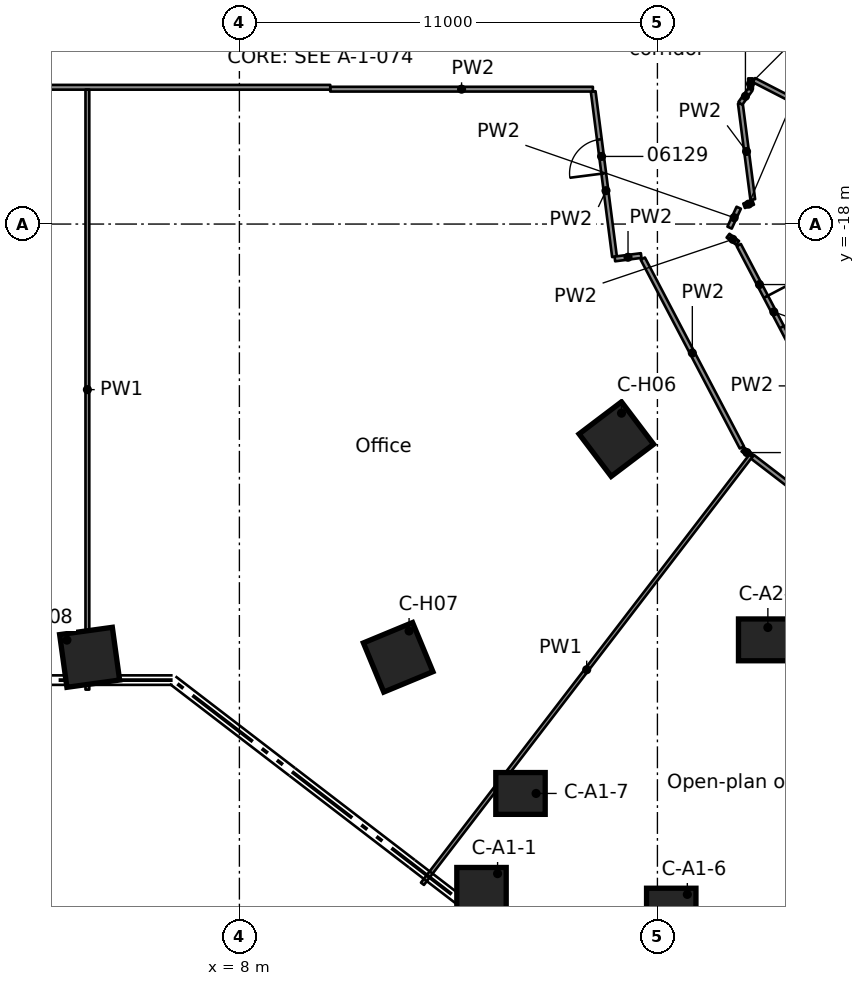
"""IFC4 building model, lengths in metres.
Left out: names, types, materials, properties, quantities, classifications, styles, units other than length and angle.
Written with IfcOpenShell. Run it as: python <this file> out.ifc"""

import sys

from ifc_helpers import new_model, si_unit, direction, frame, frame_2d, origin, origin_2d, place, context, subcontext, project, spatial, rectangle, extrude, element, fill, save


model = new_model("IFC4")
c1 = context("Model", 3, precision=1e-05, world=origin(), true_north=direction((0.0, 1.0)))
c2 = subcontext(c1, "Body", "Model", "MODEL_VIEW")
j1 = project(units=[si_unit("LENGTHUNIT", "METRE"), si_unit("PLANEANGLEUNIT", "RADIAN")], contexts=[c1])
p1 = place(None, origin())
s1 = spatial("IfcSite", under=j1, at=p1, CompositionType="ELEMENT")
p2 = place(p1, origin())
s2 = spatial("IfcBuilding", under=s1, at=p2, CompositionType="ELEMENT")
p3 = place(p2, frame((0.0, 0.0, 29.2)))
s3 = spatial("IfcBuildingStorey", under=s2, at=p3, CompositionType="ELEMENT", Elevation=29.2)
for number, where, z_axis, x_axis in (
    (1, (14.371, -35.48, 0.0), (0.0, 0.0, 1.0), (1.0, 0.0, 0.0)),
    (2, (19.364, -36.026, 0.0), (0.0, 0.0, 1.0), (1.0, 0.0, 0.0)),
    (3, (15.397, -32.982, 0.0), (0.0, 0.0, 1.0), (1.0, 0.0, 0.0)),
    (4, (21.783, -28.941, 0.0), (0.0, 0.0, 1.0), (1.0, 0.0, 0.0)),
):
    element("IfcColumn", number, at=place(p3, frame(where, z_axis=z_axis, x_axis=x_axis)), inside=s3, PredefinedType="COLUMN", context=c2, shape_type="SweptSolid", body=[
        extrude(rectangle(XDim=1.3, YDim=1.1, at=origin_2d()), origin(), (0.0, 0.0, 1.0), 4.1),
    ])
for number, where, z_axis, x_axis in (
    (5, (17.919, -23.659, 0.0), (0.0, 0.0, 1.0), (0.604, -0.797, 0.0)),
    (6, (12.178, -29.4, 0.0), (0.0, 0.0, 1.0), (0.383, -0.924, 0.0)),
    (7, (4.059, -29.4, 0.0), (0.0, 0.0, 1.0), (0.137, -0.991, 0.0)),
):
    element("IfcColumn", number, at=place(p3, frame(where, z_axis=z_axis, x_axis=x_axis)), inside=s3, PredefinedType="COLUMN", context=c2, shape_type="SweptSolid", body=[
        extrude(rectangle(XDim=1.4, YDim=1.4, at=origin_2d()), origin(), (0.0, 0.0, 1.0), 4.1),
    ])
p4 = place(p3, frame((17.871, -18.861, 0.0), z_axis=(0.0, 0.0, 1.0), x_axis=(-0.127967803782, 0.991778322608, 0.0)))
e8 = element("IfcWall", 8, at=p4, inside=s3, PredefinedType="PARTITIONING", context=c2, shape_type="SweptSolid", body=[
    extrude(rectangle(XDim=4.384, YDim=0.125, at=frame_2d((2.192, 0.0))), origin(), (0.0, 0.0, 1.0), 3.66),
])
p5 = place(p4, frame((2.212, 0.0, 0.0)))
e9 = element("IfcOpeningElement", 9, at=p5, cuts=e8, PredefinedType="OPENING", context=c2, shape_type="SweptSolid", body=[
    extrude(rectangle(XDim=0.9, YDim=2.1, at=frame_2d((0.45, 1.05))), frame((0.0, 0.073, 0.0), z_axis=(0.0, -1.0, 0.0), x_axis=(1.0, 0.0, 0.0)), (0.0, 0.0, 1.0), 0.145),
])
p6 = place(p3, frame((21.182, -14.826, 0.0), z_axis=(0.0, 0.0, 1.0), x_axis=(0.128335992274, -0.991730746265, 0.0)))
e10 = element("IfcWall", 10, at=p6, inside=s3, PredefinedType="PARTITIONING", context=c2, shape_type="SweptSolid", body=[
    extrude(rectangle(XDim=2.549, YDim=0.125, at=frame_2d((1.274, 0.0))), origin(), (0.0, 0.0, 1.0), 3.66),
])
p7 = place(p3, frame((18.615, -18.909, 0.0), z_axis=(0.0, 0.0, 1.0), x_axis=(0.464655649815, -0.885491460769, 0.0)))
e11 = element("IfcWall", 11, at=p7, inside=s3, PredefinedType="PARTITIONING", context=c2, shape_type="SweptSolid", body=[
    extrude(rectangle(XDim=5.61, YDim=0.125, at=frame_2d((2.805, 0.0))), origin(), (0.0, 0.0, 1.0), 3.66),
])
p8 = place(p3, frame((21.14, -18.552, 0.0), z_axis=(0.0, 0.0, 1.0), x_axis=(0.464519693812, -0.885562789451, 0.0)))
e12 = element("IfcWall", 12, at=p8, inside=s3, PredefinedType="PARTITIONING", context=c2, shape_type="SweptSolid", body=[
    extrude(rectangle(XDim=3.914, YDim=0.125, at=frame_2d((1.957, 0.0))), origin(), (0.0, 0.0, 1.0), 3.66),
])
p9 = place(p8, frame((1.538, 0.0, 0.0)))
e13 = element("IfcOpeningElement", 13, at=p9, cuts=e12, PredefinedType="OPENING", context=c2, shape_type="SweptSolid", body=[
    extrude(rectangle(XDim=0.9, YDim=2.1, at=frame_2d((0.45, 1.05))), frame((0.0, 0.073, 0.0), z_axis=(0.0, -1.0, 0.0), x_axis=(1.0, 0.0, 0.0)), (0.0, 0.0, 1.0), 0.145),
])
p10 = place(p3, frame((39.09, -37.62, 0.0), z_axis=(0.0, 0.0, 1.0), x_axis=(-0.793364364442, 0.608747061786, 0.0)))
e14 = element("IfcWall", 14, at=p10, inside=s3, PredefinedType="PARTITIONING", context=c2, shape_type="SweptSolid", body=[
    extrude(rectangle(XDim=22.17, YDim=0.125, at=frame_2d((11.085, 0.0))), origin(), (0.0, 0.0, 1.0), 3.66),
])
p11 = place(p10, frame((1.1, 0.0, 0.0)))
e15 = element("IfcOpeningElement", 15, at=p11, cuts=e14, PredefinedType="OPENING", context=c2, shape_type="SweptSolid", body=[
    extrude(rectangle(XDim=0.9, YDim=2.1, at=frame_2d((0.45, 1.05))), frame((0.0, 0.073, 0.0), z_axis=(0.0, -1.0, 0.0), x_axis=(1.0, 0.0, 0.0)), (0.0, 0.0, 1.0), 0.145),
])
p12 = place(p10, frame((16.263, 0.0, 0.0)))
e16 = element("IfcOpeningElement", 16, at=p12, cuts=e14, PredefinedType="OPENING", context=c2, shape_type="SweptSolid", body=[
    extrude(rectangle(XDim=1.8, YDim=2.1, at=frame_2d((0.9, 1.05))), frame((0.0, 0.073, 0.0), z_axis=(0.0, -1.0, 0.0), x_axis=(1.0, 0.0, 0.0)), (0.0, 0.0, 1.0), 0.145),
])
p13 = place(p10, frame((7.113, 0.0, 0.0)))
e17 = element("IfcOpeningElement", 17, at=p13, cuts=e14, PredefinedType="OPENING", context=c2, shape_type="SweptSolid", body=[
    extrude(rectangle(XDim=0.9, YDim=2.1, at=frame_2d((0.45, 1.05))), frame((0.0, 0.073, 0.0), z_axis=(0.0, -1.0, 0.0), x_axis=(1.0, 0.0, 0.0)), (0.0, 0.0, 1.0), 0.145),
])
p14 = place(p3, frame((21.251, -23.933, 0.0), z_axis=(0.0, 0.0, 1.0), x_axis=(0.795537882178, -0.605903852124, 0.0)))
e18 = element("IfcWall", 18, at=p14, inside=s3, PredefinedType="PARTITIONING", context=c2, shape_type="SweptSolid", body=[
    extrude(rectangle(XDim=0.264, YDim=0.125, at=frame_2d((0.132, 0.0))), origin(), (0.0, 0.0, 1.0), 3.66),
])
p15 = place(p3, frame((20.858, -18.306, 0.0), z_axis=(0.0, 0.0, 1.0), x_axis=(0.798056474533, -0.602582661098, 0.0)))
e19 = element("IfcWall", 19, at=p15, inside=s3, PredefinedType="PARTITIONING", context=c2, shape_type="SweptSolid", body=[
    extrude(rectangle(XDim=0.317, YDim=0.125, at=frame_2d((0.159, 0.0))), origin(), (0.0, 0.0, 1.0), 3.66),
])
p16 = place(p3, frame((21.541, -14.214, 0.0), z_axis=(0.0, 0.0, 1.0), x_axis=(0.889437525622, -0.457056766732, 0.0)))
e20 = element("IfcWall", 20, at=p16, inside=s3, PredefinedType="PARTITIONING", context=c2, shape_type="SweptSolid", body=[
    extrude(rectangle(XDim=5.986, YDim=0.125, at=frame_2d((2.993, 0.0))), origin(), (0.0, 0.0, 1.0), 3.66),
])
p17 = place(p3, frame((21.541, -9.94, 0.0), z_axis=(0.0, 0.0, 1.0), x_axis=(0.889469569246, -0.456994404107, 0.0)))
e21 = element("IfcWall", 21, at=p17, inside=s3, PredefinedType="PARTITIONING", context=c2, shape_type="SweptSolid", body=[
    extrude(rectangle(XDim=8.394, YDim=0.125, at=frame_2d((4.197, 0.0))), origin(), (0.0, 0.0, 1.0), 3.66),
])
p18 = place(p3, frame((10.391, -14.451, 0.0), z_axis=(0.0, 0.0, 1.0), x_axis=(1.0, 0.0, 0.0)))
e22 = element("IfcWall", 22, at=p18, inside=s3, PredefinedType="PARTITIONING", context=c2, shape_type="SweptSolid", body=[
    extrude(rectangle(XDim=6.911, YDim=0.125, at=frame_2d((3.456, 0.0))), origin(), (0.0, 0.0, 1.0), 3.66),
])
p19 = place(p3, frame((21.182, -14.826, 0.0), z_axis=(0.0, 0.0, 1.0), x_axis=(0.581538757464, 0.813518698966, 0.0)))
e23 = element("IfcWall", 23, at=p19, inside=s3, PredefinedType="PARTITIONING", context=c2, shape_type="SweptSolid", body=[
    extrude(rectangle(XDim=0.461, YDim=0.125, at=frame_2d((0.23, 0.0))), origin(), (0.0, 0.0, 1.0), 3.66),
])
p20 = place(p3, frame((10.391, -14.401, 0.0), z_axis=(0.0, 0.0, 1.0), x_axis=(-1.0, 0.0, 0.0)))
e24 = element("IfcWall", 24, at=p20, inside=s3, PredefinedType="PARTITIONING", context=c2, shape_type="SweptSolid", body=[
    extrude(rectangle(XDim=20.781, YDim=0.125, at=frame_2d((10.391, 0.0))), origin(), (0.0, 0.0, 1.0), 3.66),
])
p21 = place(p20, frame((16.186, 0.0, 0.0)))
e25 = element("IfcOpeningElement", 25, at=p21, cuts=e24, PredefinedType="OPENING", context=c2, shape_type="SweptSolid", body=[
    extrude(rectangle(XDim=1.8, YDim=2.1, at=frame_2d((0.9, 1.05))), frame((0.0, 0.073, 0.0), z_axis=(0.0, -1.0, 0.0), x_axis=(1.0, 0.0, 0.0)), (0.0, 0.0, 1.0), 0.145),
])
p22 = place(p20, frame((9.491, 0.0, 0.0)))
e26 = element("IfcOpeningElement", 26, at=p22, cuts=e24, PredefinedType="OPENING", context=c2, shape_type="SweptSolid", body=[
    extrude(rectangle(XDim=0.9, YDim=2.1, at=frame_2d((0.45, 1.05))), frame((0.0, 0.073, 0.0), z_axis=(0.0, -1.0, 0.0), x_axis=(1.0, 0.0, 0.0)), (0.0, 0.0, 1.0), 0.145),
])
p23 = place(p3, frame((17.88, -18.918, 0.0), z_axis=(0.0, 0.0, 1.0), x_axis=(0.991880534709, 0.127173129494, 0.0)))
e27 = element("IfcWall", 27, at=p23, inside=s3, PredefinedType="PARTITIONING", context=c2, shape_type="SweptSolid", body=[
    extrude(rectangle(XDim=0.699, YDim=0.125, at=frame_2d((0.349, 0.0))), origin(), (0.0, 0.0, 1.0), 3.66),
])
p24 = place(p3, frame((21.281, -17.519, 0.0), z_axis=(0.0, 0.0, 1.0), x_axis=(0.939031864477, 0.343830128839, 0.0)))
e28 = element("IfcWall", 28, at=p24, inside=s3, PredefinedType="PARTITIONING", context=c2, shape_type="SweptSolid", body=[
    extrude(rectangle(XDim=0.253, YDim=0.125, at=frame_2d((0.127, 0.0))), origin(), (0.0, 0.0, 1.0), 3.66),
])
p25 = place(p3, frame((20.993, -41.633, 0.0), z_axis=(0.0, 0.0, 1.0), x_axis=(0.608829906099, 0.793300791277, 0.0)))
e29 = element("IfcWall", 29, at=p25, inside=s3, PredefinedType="PARTITIONING", context=c2, shape_type="SweptSolid", body=[
    extrude(rectangle(XDim=14.137, YDim=0.1, at=frame_2d((7.069, 0.0))), origin(), (0.0, 0.0, 1.0), 3.66),
])
p26 = place(p3, frame((12.817, -35.359, 0.0), z_axis=(0.0, 0.0, 1.0), x_axis=(0.608769712687, 0.793346983932, 0.0)))
e30 = element("IfcWall", 30, at=p26, inside=s3, PredefinedType="PARTITIONING", context=c2, shape_type="SweptSolid", body=[
    extrude(rectangle(XDim=14.199, YDim=0.1, at=frame_2d((7.1, 0.0))), origin(), (0.0, 0.0, 1.0), 3.66),
])
p27 = place(p3, frame((20.899, -18.094, 0.0), z_axis=(0.0, 0.0, 1.0), x_axis=(0.417849700766, 0.908516168029, 0.0)))
e31 = element("IfcWall", 31, at=p27, inside=s3, PredefinedType="PARTITIONING", context=c2, shape_type="SweptSolid", body=[
    extrude(rectangle(XDim=0.577, YDim=0.125, at=frame_2d((0.288, 0.0))), origin(), (0.0, 0.0, 1.0), 3.66),
])
p28 = place(p3, frame((21.45, -14.451, 0.0), z_axis=(0.0, 0.0, 1.0), x_axis=(0.0, 1.0, 0.0)))
e32 = element("IfcWall", 32, at=p28, inside=s3, PredefinedType="PARTITIONING", context=c2, shape_type="SweptSolid", body=[
    extrude(rectangle(XDim=0.284, YDim=0.125, at=frame_2d((0.142, 0.0))), origin(), (0.0, 0.0, 1.0), 3.66),
])
p29 = place(p3, frame((4.0, -30.25, 0.0), z_axis=(0.0, 0.0, 1.0), x_axis=(0.0, 1.0, 0.0)))
e33 = element("IfcWall", 33, at=p29, inside=s3, PredefinedType="PARTITIONING", context=c2, shape_type="SweptSolid", body=[
    extrude(rectangle(XDim=15.787, YDim=0.1, at=frame_2d((7.894, 0.0))), origin(), (0.0, 0.0, 1.0), 3.66),
])
p30 = place(p5, origin())
e34 = element("IfcDoor", 34, at=p30, inside=s3, OperationType="SINGLE_SWING_RIGHT", PredefinedType="DOOR", context=c2, shape_type="SweptSolid", body=[
    extrude(rectangle(XDim=0.9, YDim=2.1, at=frame_2d((0.45, 1.05))), frame((0.0, 0.025, 0.0), z_axis=(0.0, -1.0, 0.0), x_axis=(1.0, 0.0, 0.0)), (0.0, 0.0, 1.0), 0.05),
])
fill(e9, e34)
p31 = place(p9, origin())
e35 = element("IfcDoor", 35, at=p31, inside=s3, OperationType="SINGLE_SWING_RIGHT", PredefinedType="DOOR", context=c2, shape_type="SweptSolid", body=[
    extrude(rectangle(XDim=0.9, YDim=2.1, at=frame_2d((0.45, 1.05))), frame((0.0, 0.025, 0.0), z_axis=(0.0, -1.0, 0.0), x_axis=(1.0, 0.0, 0.0)), (0.0, 0.0, 1.0), 0.05),
])
fill(e13, e35)
save(model, sys.argv[1])
